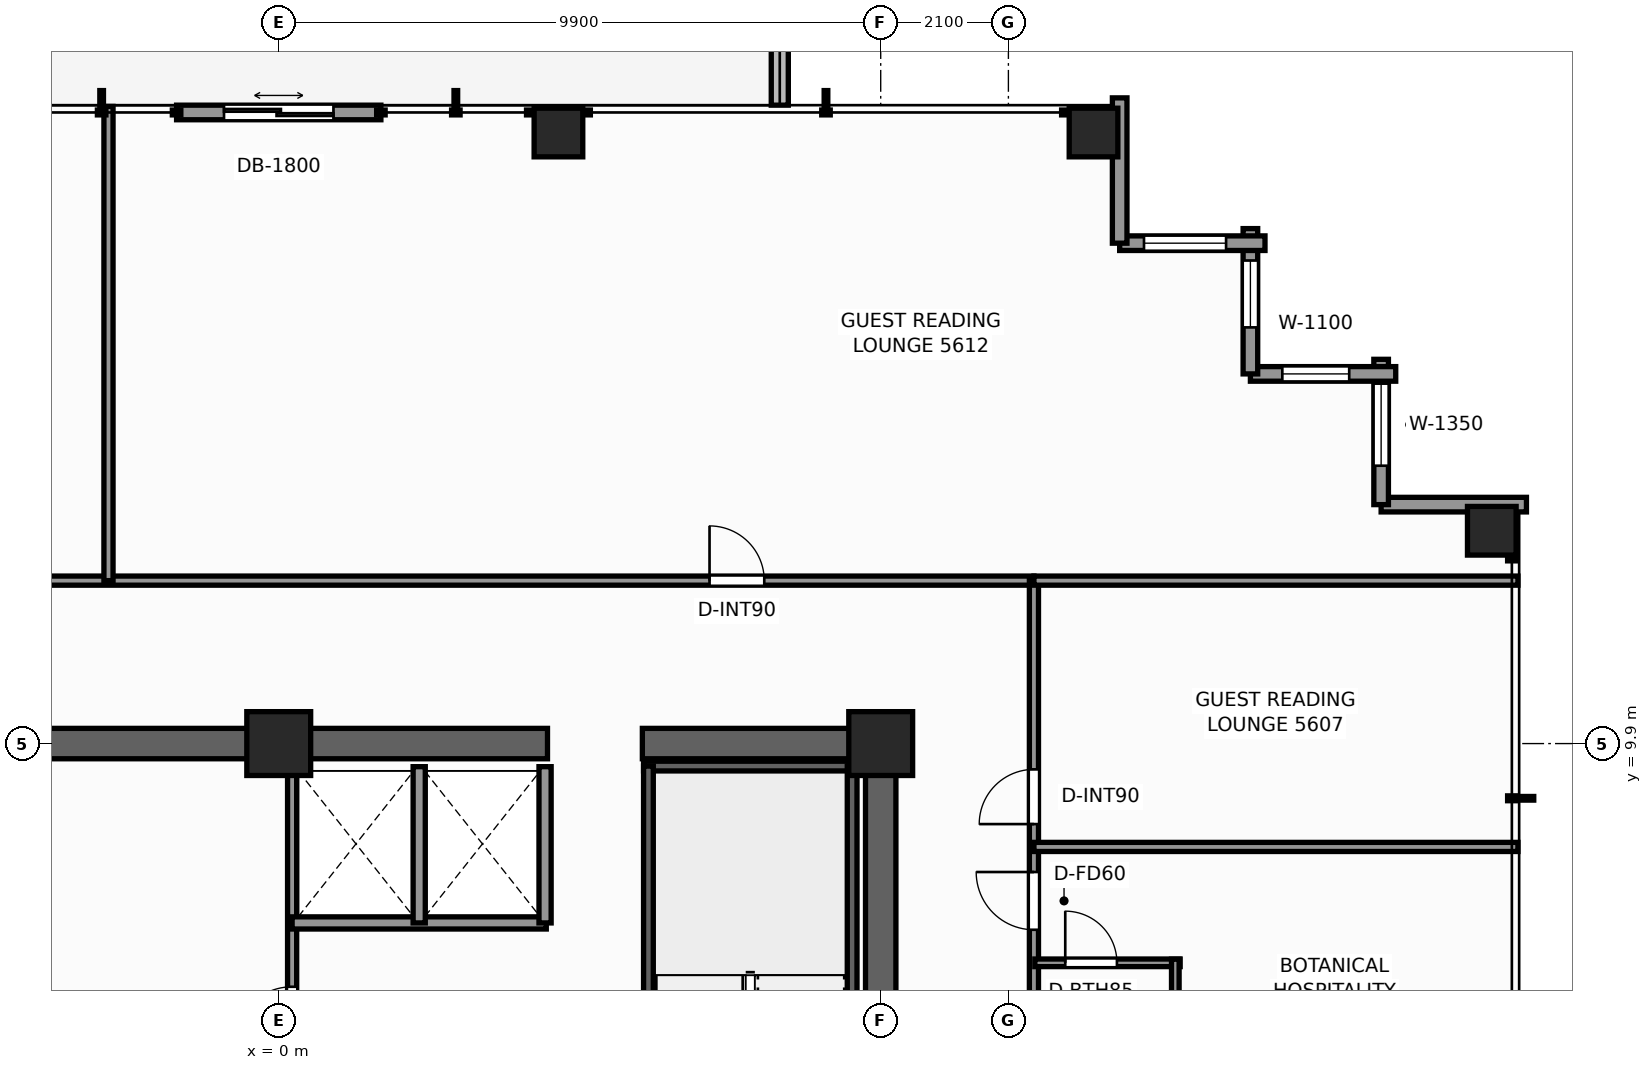
"""IFC4 building model, lengths in metres.
Left out: names, types, materials, properties, quantities, classifications, styles, units other than length and angle.
Written with IfcOpenShell. Run it as: python <this file> out.ifc"""

import sys

from ifc_helpers import new_model, si_unit, direction, frame, frame_2d, origin, origin_2d, place, context, subcontext, project, spatial, rectangle, extrude, element, fill, save


model = new_model("IFC4")
c1 = context("Model", 3, precision=1e-05, world=origin(), true_north=direction((0.0, 1.0)))
c2 = subcontext(c1, "Body", "Model", "MODEL_VIEW")
j1 = project(units=[si_unit("LENGTHUNIT", "METRE"), si_unit("PLANEANGLEUNIT", "RADIAN")], contexts=[c1])
p1 = place(None, origin())
s1 = spatial("IfcSite", under=j1, at=p1, CompositionType="ELEMENT")
p2 = place(p1, origin())
s2 = spatial("IfcBuilding", under=s1, at=p2, CompositionType="ELEMENT")
p3 = place(p2, frame((0.0, 0.0, 193.2)))
s3 = spatial("IfcBuildingStorey", under=s2, at=p3, CompositionType="ELEMENT", Elevation=193.2)
p4 = place(p3, frame((-10.15, 9.9, 0.0), z_axis=(0.0, 0.0, 1.0), x_axis=(1.0, 0.0, 0.0)))
e1 = element("IfcWall", 1, at=p4, inside=s3, PredefinedType="SHEAR", context=c2, shape_type="SweptSolid", body=[
    extrude(rectangle(XDim=14.57, YDim=0.5, at=frame_2d((7.285, 0.0))), origin(), (0.0, 0.0, 1.0), 3.3),
])
p5 = place(p3, frame((5.98, 9.9, 0.0), z_axis=(0.0, 0.0, 1.0), x_axis=(1.0, 0.0, 0.0)))
e2 = element("IfcWall", 2, at=p5, inside=s3, PredefinedType="SHEAR", context=c2, shape_type="SweptSolid", body=[
    extrude(rectangle(XDim=4.17, YDim=0.5, at=frame_2d((2.085, 0.0))), origin(), (0.0, 0.0, 1.0), 3.3),
])
p6 = place(p3, frame((9.9, -3.7, 0.0), z_axis=(0.0, 0.0, 1.0), x_axis=(0.0, 1.0, 0.0)))
e3 = element("IfcWall", 3, at=p6, inside=s3, PredefinedType="SHEAR", context=c2, shape_type="SweptSolid", body=[
    extrude(rectangle(XDim=13.35, YDim=0.5, at=frame_2d((6.675, 0.0))), origin(), (0.0, 0.0, 1.0), 3.3),
])
p7 = place(p6, frame((0.35, 0.0, 0.0)))
e4 = element("IfcOpeningElement", 4, at=p7, cuts=e3, PredefinedType="OPENING", context=c2, shape_type="SweptSolid", body=[
    extrude(rectangle(XDim=1.1, YDim=2.2, at=frame_2d((0.55, 1.1))), frame((0.0, 0.26, 0.0), z_axis=(0.0, -1.0, 0.0), x_axis=(1.0, 0.0, 0.0)), (0.0, 0.0, 1.0), 0.52),
])
for number, where, z_axis, x_axis in (
    (5, (9.9, 9.9, 0.0), (0.0, 0.0, 1.0), (1.0, 0.0, 0.0)),
    (6, (0.0, 9.9, 0.0), (0.0, 0.0, 1.0), (1.0, 0.0, 0.0)),
):
    element("IfcColumn", number, at=place(p3, frame(where, z_axis=z_axis, x_axis=x_axis)), inside=s3, PredefinedType="COLUMN", context=c2, shape_type="SweptSolid", body=[
        extrude(rectangle(XDim=1.05, YDim=1.05, at=origin_2d()), origin(), (0.0, 0.0, 1.0), 3.3),
    ])
for number, where, z_axis, x_axis in (
    (7, (4.6, 19.95, 0.0), (0.0, 0.0, 1.0), (1.0, 0.0, 0.0)),
    (8, (13.4, 19.95, 0.0), (0.0, 0.0, 1.0), (1.0, 0.0, 0.0)),
    (9, (19.95, 13.4, 0.0), (0.0, 0.0, 1.0), (1.0, 0.0, 0.0)),
):
    element("IfcColumn", number, at=place(p3, frame(where, z_axis=z_axis, x_axis=x_axis)), inside=s3, PredefinedType="COLUMN", context=c2, shape_type="SweptSolid", body=[
        extrude(rectangle(XDim=0.8, YDim=0.8, at=origin_2d()), origin(), (0.0, 0.0, 1.0), 3.3),
    ])
p8 = place(p3, frame((8.24, 20.4, -0.04), z_axis=(0.0, 0.0, 1.0), x_axis=(0.0, 1.0, 0.0)))
e10 = element("IfcWall", 10, at=p8, inside=s3, PredefinedType="PARAPET", context=c2, shape_type="SweptSolid", body=[
    extrude(rectangle(XDim=2.34, YDim=0.28, at=frame_2d((1.17, 0.0))), origin(), (0.0, 0.0, 1.0), 0.42),
])
p9 = place(p3, frame((18.13, 13.83, 0.0), z_axis=(0.0, 0.0, 1.0), x_axis=(1.0, 0.0, 0.0)))
e11 = element("IfcWall", 11, at=p9, inside=s3, PredefinedType="STANDARD", context=c2, shape_type="SweptSolid", body=[
    extrude(rectangle(XDim=2.39, YDim=0.24, at=frame_2d((1.195, 0.0))), origin(), (0.0, 0.0, 1.0), 2.463),
])
p10 = place(p3, frame((18.13, 16.22, 0.0), z_axis=(0.0, 0.0, 1.0), x_axis=(0.0, -1.0, 0.0)))
e12 = element("IfcWall", 12, at=p10, inside=s3, PredefinedType="STANDARD", context=c2, shape_type="SweptSolid", body=[
    extrude(rectangle(XDim=2.39, YDim=0.24, at=frame_2d((1.195, 0.0))), origin(), (0.0, 0.0, 1.0), 2.463),
])
p11 = place(p10, frame((0.4, 0.0, 0.65)))
e13 = element("IfcOpeningElement", 13, at=p11, cuts=e12, PredefinedType="OPENING", context=c2, shape_type="SweptSolid", body=[
    extrude(rectangle(XDim=1.35, YDim=1.55, at=frame_2d((0.675, 0.775))), frame((0.0, 0.13, 0.0), z_axis=(0.0, -1.0, 0.0), x_axis=(1.0, 0.0, 0.0)), (0.0, 0.0, 1.0), 0.26),
])
p12 = place(p3, frame((15.98, 15.98, 0.0), z_axis=(0.0, 0.0, 1.0), x_axis=(1.0, 0.0, 0.0)))
e14 = element("IfcWall", 14, at=p12, inside=s3, PredefinedType="STANDARD", context=c2, shape_type="SweptSolid", body=[
    extrude(rectangle(XDim=2.39, YDim=0.24, at=frame_2d((1.195, 0.0))), origin(), (0.0, 0.0, 1.0), 2.463),
])
p13 = place(p12, frame((0.525, 0.0, 0.65)))
e15 = element("IfcOpeningElement", 15, at=p13, cuts=e14, PredefinedType="OPENING", context=c2, shape_type="SweptSolid", body=[
    extrude(rectangle(XDim=1.1, YDim=1.45, at=frame_2d((0.55, 0.725))), frame((0.0, 0.13, 0.0), z_axis=(0.0, -1.0, 0.0), x_axis=(1.0, 0.0, 0.0)), (0.0, 0.0, 1.0), 0.26),
])
p14 = place(p3, frame((15.98, 18.37, 0.0), z_axis=(0.0, 0.0, 1.0), x_axis=(0.0, -1.0, 0.0)))
e16 = element("IfcWall", 16, at=p14, inside=s3, PredefinedType="STANDARD", context=c2, shape_type="SweptSolid", body=[
    extrude(rectangle(XDim=2.39, YDim=0.24, at=frame_2d((1.195, 0.0))), origin(), (0.0, 0.0, 1.0), 2.463),
])
p15 = place(p14, frame((0.525, 0.0, 0.65)))
e17 = element("IfcOpeningElement", 17, at=p15, cuts=e16, PredefinedType="OPENING", context=c2, shape_type="SweptSolid", body=[
    extrude(rectangle(XDim=1.1, YDim=1.45, at=frame_2d((0.55, 0.725))), frame((0.0, 0.13, 0.0), z_axis=(0.0, -1.0, 0.0), x_axis=(1.0, 0.0, 0.0)), (0.0, 0.0, 1.0), 0.26),
])
p16 = place(p3, frame((13.83, 18.13, 0.0), z_axis=(0.0, 0.0, 1.0), x_axis=(1.0, 0.0, 0.0)))
e18 = element("IfcWall", 18, at=p16, inside=s3, PredefinedType="STANDARD", context=c2, shape_type="SweptSolid", body=[
    extrude(rectangle(XDim=2.39, YDim=0.24, at=frame_2d((1.195, 0.0))), origin(), (0.0, 0.0, 1.0), 2.463),
])
p17 = place(p16, frame((0.4, 0.0, 0.65)))
e19 = element("IfcOpeningElement", 19, at=p17, cuts=e18, PredefinedType="OPENING", context=c2, shape_type="SweptSolid", body=[
    extrude(rectangle(XDim=1.35, YDim=1.55, at=frame_2d((0.675, 0.775))), frame((0.0, 0.13, 0.0), z_axis=(0.0, -1.0, 0.0), x_axis=(1.0, 0.0, 0.0)), (0.0, 0.0, 1.0), 0.26),
])
p18 = place(p3, frame((13.83, 20.52, 0.0), z_axis=(0.0, 0.0, 1.0), x_axis=(0.0, -1.0, 0.0)))
e20 = element("IfcWall", 20, at=p18, inside=s3, PredefinedType="STANDARD", context=c2, shape_type="SweptSolid", body=[
    extrude(rectangle(XDim=2.39, YDim=0.24, at=frame_2d((1.195, 0.0))), origin(), (0.0, 0.0, 1.0), 2.463),
])
p19 = place(p3, frame((-1.68, 20.28, 0.0), z_axis=(0.0, 0.0, 1.0), x_axis=(1.0, 0.0, 0.0)))
e21 = element("IfcWall", 21, at=p19, inside=s3, PredefinedType="STANDARD", context=c2, shape_type="SweptSolid", body=[
    extrude(rectangle(XDim=3.36, YDim=0.24, at=frame_2d((1.68, 0.0))), origin(), (0.0, 0.0, 1.0), 3.08),
])
p20 = place(p19, frame((0.78, 0.0, 0.0)))
e22 = element("IfcOpeningElement", 22, at=p20, cuts=e21, PredefinedType="OPENING", context=c2, shape_type="SweptSolid", body=[
    extrude(rectangle(XDim=1.8, YDim=2.2, at=frame_2d((0.9, 1.1))), frame((0.0, 0.13, 0.0), z_axis=(0.0, -1.0, 0.0), x_axis=(1.0, 0.0, 0.0)), (0.0, 0.0, 1.0), 0.26),
])
p21 = place(p3, frame((6.0, 9.53, 0.0), z_axis=(0.0, 0.0, 1.0), x_axis=(1.0, 0.0, 0.0)))
e23 = element("IfcWall", 23, at=p21, inside=s3, PredefinedType="SHEAR", context=c2, shape_type="SweptSolid", body=[
    extrude(rectangle(XDim=3.52, YDim=0.16, at=frame_2d((1.76, 0.0))), origin(), (0.0, 0.0, 1.0), 3.3),
])
for number, where, z_axis, x_axis in (
    (24, (6.08, 1.97, 0.0), (0.0, 0.0, 1.0), (0.0, 1.0, 0.0)),
    (25, (9.43, 1.97, 0.0), (0.0, 0.0, 1.0), (0.0, 1.0, 0.0)),
):
    element("IfcWall", number, at=place(p3, frame(where, z_axis=z_axis, x_axis=x_axis)), inside=s3, PredefinedType="SHEAR", context=c2, shape_type="SweptSolid", body=[
        extrude(rectangle(XDim=7.56, YDim=0.16, at=frame_2d((3.78, 0.0))), origin(), (0.0, 0.0, 1.0), 3.3),
    ])
p22 = place(p3, frame((0.22, 4.3, 0.0), z_axis=(0.0, 0.0, 1.0), x_axis=(0.0, 1.0, 0.0)))
e26 = element("IfcWall", 26, at=p22, inside=s3, PredefinedType="PARTITIONING", context=c2, shape_type="SweptSolid", body=[
    extrude(rectangle(XDim=5.22, YDim=0.15, at=frame_2d((2.61, 0.0))), origin(), (0.0, 0.0, 1.0), 3.08),
])
p23 = place(p22, frame((0.65, 0.0, 0.0)))
e27 = element("IfcOpeningElement", 27, at=p23, cuts=e26, PredefinedType="OPENING", context=c2, shape_type="SweptSolid", body=[
    extrude(rectangle(XDim=0.95, YDim=2.06, at=frame_2d((0.475, 1.03))), frame((0.0, 0.085, 0.0), z_axis=(0.0, -1.0, 0.0), x_axis=(1.0, 0.0, 0.0)), (0.0, 0.0, 1.0), 0.17),
])
p24 = place(p3, frame((0.22, 6.95, 0.0), z_axis=(0.0, 0.0, 1.0), x_axis=(1.0, 0.0, 0.0)))
e28 = element("IfcWall", 28, at=p24, inside=s3, PredefinedType="SOLIDWALL", context=c2, shape_type="SweptSolid", body=[
    extrude(rectangle(XDim=4.18, YDim=0.2, at=frame_2d((2.09, 0.0))), origin(), (0.0, 0.0, 1.0), 3.08),
])
for number, where, z_axis, x_axis in (
    (29, (4.38, 6.95, 0.0), (0.0, 0.0, 1.0), (0.0, 1.0, 0.0)),
    (30, (2.31, 6.95, 0.0), (0.0, 0.0, 1.0), (0.0, 1.0, 0.0)),
):
    element("IfcWall", number, at=place(p3, frame(where, z_axis=z_axis, x_axis=x_axis)), inside=s3, PredefinedType="SOLIDWALL", context=c2, shape_type="SweptSolid", body=[
        extrude(rectangle(XDim=2.57, YDim=0.2, at=frame_2d((1.285, 0.0))), origin(), (0.0, 0.0, 1.0), 3.08),
    ])
p25 = place(p3, frame((-12.42, 12.58, 0.0), z_axis=(0.0, 0.0, 1.0), x_axis=(1.0, 0.0, 0.0)))
e31 = element("IfcWall", 31, at=p25, inside=s3, PredefinedType="PARTITIONING", context=c2, shape_type="SweptSolid", body=[
    extrude(rectangle(XDim=24.84, YDim=0.15, at=frame_2d((12.42, 0.0))), origin(), (0.0, 0.0, 1.0), 2.369),
])
p26 = place(p25, frame((4.435, 0.0, 0.0)))
e32 = element("IfcOpeningElement", 32, at=p26, cuts=e31, PredefinedType="OPENING", context=c2, shape_type="SweptSolid", body=[
    extrude(rectangle(XDim=0.9, YDim=2.06, at=frame_2d((0.45, 1.03))), frame((0.0, 0.085, 0.0), z_axis=(0.0, -1.0, 0.0), x_axis=(1.0, 0.0, 0.0)), (0.0, 0.0, 1.0), 0.17),
])
p27 = place(p25, frame((19.505, 0.0, 0.0)))
e33 = element("IfcOpeningElement", 33, at=p27, cuts=e31, PredefinedType="OPENING", context=c2, shape_type="SweptSolid", body=[
    extrude(rectangle(XDim=0.9, YDim=2.06, at=frame_2d((0.45, 1.03))), frame((0.0, 0.085, 0.0), z_axis=(0.0, -1.0, 0.0), x_axis=(1.0, 0.0, 0.0)), (0.0, 0.0, 1.0), 0.17),
])
p28 = place(p3, frame((12.42, -12.26, 0.0), z_axis=(0.0, 0.0, 1.0), x_axis=(0.0, 1.0, 0.0)))
e34 = element("IfcWall", 34, at=p28, inside=s3, PredefinedType="PARTITIONING", context=c2, shape_type="SweptSolid", body=[
    extrude(rectangle(XDim=24.84, YDim=0.15, at=frame_2d((12.42, 0.0))), origin(), (0.0, 0.0, 1.0), 2.369),
])
p29 = place(p28, frame((2.944, 0.0, 0.0)))
e35 = element("IfcOpeningElement", 35, at=p29, cuts=e34, PredefinedType="OPENING", context=c2, shape_type="SweptSolid", body=[
    extrude(rectangle(XDim=0.9, YDim=2.06, at=frame_2d((0.45, 1.03))), frame((0.0, 0.085, 0.0), z_axis=(0.0, -1.0, 0.0), x_axis=(1.0, 0.0, 0.0)), (0.0, 0.0, 1.0), 0.17),
])
p30 = place(p28, frame((5.279, 0.0, 0.0)))
e36 = element("IfcOpeningElement", 36, at=p30, cuts=e34, PredefinedType="OPENING", context=c2, shape_type="SweptSolid", body=[
    extrude(rectangle(XDim=0.9, YDim=2.06, at=frame_2d((0.45, 1.03))), frame((0.0, 0.085, 0.0), z_axis=(0.0, -1.0, 0.0), x_axis=(1.0, 0.0, 0.0)), (0.0, 0.0, 1.0), 0.17),
])
p31 = place(p28, frame((13.602, 0.0, 0.0)))
e37 = element("IfcOpeningElement", 37, at=p31, cuts=e34, PredefinedType="OPENING", context=c2, shape_type="SweptSolid", body=[
    extrude(rectangle(XDim=0.9, YDim=2.06, at=frame_2d((0.45, 1.03))), frame((0.0, 0.085, 0.0), z_axis=(0.0, -1.0, 0.0), x_axis=(1.0, 0.0, 0.0)), (0.0, 0.0, 1.0), 0.17),
])
p32 = place(p28, frame((19.098, 0.0, 0.0)))
e38 = element("IfcOpeningElement", 38, at=p32, cuts=e34, PredefinedType="OPENING", context=c2, shape_type="SweptSolid", body=[
    extrude(rectangle(XDim=0.95, YDim=2.06, at=frame_2d((0.475, 1.03))), frame((0.0, 0.085, 0.0), z_axis=(0.0, -1.0, 0.0), x_axis=(1.0, 0.0, 0.0)), (0.0, 0.0, 1.0), 0.17),
])
p33 = place(p28, frame((20.836, 0.0, 0.0)))
e39 = element("IfcOpeningElement", 39, at=p33, cuts=e34, PredefinedType="OPENING", context=c2, shape_type="SweptSolid", body=[
    extrude(rectangle(XDim=0.9, YDim=2.06, at=frame_2d((0.45, 1.03))), frame((0.0, 0.085, 0.0), z_axis=(0.0, -1.0, 0.0), x_axis=(1.0, 0.0, 0.0)), (0.0, 0.0, 1.0), 0.17),
])
p34 = place(p3, frame((12.42, 12.58, 0.0), z_axis=(0.0, 0.0, 1.0), x_axis=(1.0, 0.0, 0.0)))
e40 = element("IfcWall", 40, at=p34, inside=s3, PredefinedType="PARTITIONING", context=c2, shape_type="SweptSolid", body=[
    extrude(rectangle(XDim=7.96, YDim=0.15, at=frame_2d((3.98, 0.0))), origin(), (0.0, 0.0, 1.0), 2.369),
])
p35 = place(p3, frame((12.42, 8.2, 0.0), z_axis=(0.0, 0.0, 1.0), x_axis=(1.0, 0.0, 0.0)))
e41 = element("IfcWall", 41, at=p35, inside=s3, PredefinedType="PARTITIONING", context=c2, shape_type="SweptSolid", body=[
    extrude(rectangle(XDim=7.96, YDim=0.15, at=frame_2d((3.98, 0.0))), origin(), (0.0, 0.0, 1.0), 2.453),
])
p36 = place(p3, frame((12.435, 6.294, 0.0), z_axis=(0.0, 0.0, 1.0), x_axis=(1.0, 0.0, 0.0)))
e42 = element("IfcWall", 42, at=p36, inside=s3, PredefinedType="PARTITIONING", context=c2, shape_type="SweptSolid", body=[
    extrude(rectangle(XDim=2.39, YDim=0.125, at=frame_2d((1.195, 0.0))), origin(), (0.0, 0.0, 1.0), 3.08),
])
p37 = place(p36, frame((0.5, 0.0, 0.0)))
e43 = element("IfcOpeningElement", 43, at=p37, cuts=e42, PredefinedType="OPENING", context=c2, shape_type="SweptSolid", body=[
    extrude(rectangle(XDim=0.85, YDim=2.03, at=frame_2d((0.425, 1.015))), frame((0.0, 0.073, 0.0), z_axis=(0.0, -1.0, 0.0), x_axis=(1.0, 0.0, 0.0)), (0.0, 0.0, 1.0), 0.145),
])
p38 = place(p3, frame((14.745, 3.584, 0.0), z_axis=(0.0, 0.0, 1.0), x_axis=(0.0, 1.0, 0.0)))
e44 = element("IfcWall", 44, at=p38, inside=s3, PredefinedType="PARTITIONING", context=c2, shape_type="SweptSolid", body=[
    extrude(rectangle(XDim=2.77, YDim=0.125, at=frame_2d((1.385, 0.0))), origin(), (0.0, 0.0, 1.0), 2.369),
])
p39 = place(p3, frame((-2.8, 12.58, 0.0), z_axis=(0.0, 0.0, 1.0), x_axis=(0.0, 1.0, 0.0)))
e45 = element("IfcWall", 45, at=p39, inside=s3, PredefinedType="PARTITIONING", context=c2, shape_type="SweptSolid", body=[
    extrude(rectangle(XDim=7.8, YDim=0.15, at=frame_2d((3.9, 0.0))), origin(), (0.0, 0.0, 1.0), 2.453),
])
p40 = place(p11, origin())
e46 = element("IfcWindow", 46, at=p40, inside=s3, PartitioningType="SINGLE_PANEL", PredefinedType="WINDOW", context=c2, shape_type="SweptSolid", body=[
    extrude(rectangle(XDim=1.35, YDim=1.55, at=frame_2d((0.675, 0.775))), frame((0.0, 0.03, 0.0), z_axis=(0.0, -1.0, 0.0), x_axis=(1.0, 0.0, 0.0)), (0.0, 0.0, 1.0), 0.06),
])
fill(e13, e46)
p41 = place(p13, origin())
e47 = element("IfcWindow", 47, at=p41, inside=s3, PartitioningType="SINGLE_PANEL", PredefinedType="WINDOW", context=c2, shape_type="SweptSolid", body=[
    extrude(rectangle(XDim=1.1, YDim=1.45, at=frame_2d((0.55, 0.725))), frame((0.0, 0.03, 0.0), z_axis=(0.0, -1.0, 0.0), x_axis=(1.0, 0.0, 0.0)), (0.0, 0.0, 1.0), 0.06),
])
fill(e15, e47)
p42 = place(p15, origin())
e48 = element("IfcWindow", 48, at=p42, inside=s3, PartitioningType="SINGLE_PANEL", PredefinedType="WINDOW", context=c2, shape_type="SweptSolid", body=[
    extrude(rectangle(XDim=1.1, YDim=1.45, at=frame_2d((0.55, 0.725))), frame((0.0, 0.03, 0.0), z_axis=(0.0, -1.0, 0.0), x_axis=(1.0, 0.0, 0.0)), (0.0, 0.0, 1.0), 0.06),
])
fill(e17, e48)
p43 = place(p17, origin())
e49 = element("IfcWindow", 49, at=p43, inside=s3, PartitioningType="SINGLE_PANEL", PredefinedType="WINDOW", context=c2, shape_type="SweptSolid", body=[
    extrude(rectangle(XDim=1.35, YDim=1.55, at=frame_2d((0.675, 0.775))), frame((0.0, 0.03, 0.0), z_axis=(0.0, -1.0, 0.0), x_axis=(1.0, 0.0, 0.0)), (0.0, 0.0, 1.0), 0.06),
])
fill(e19, e49)
p44 = place(p20, origin())
e50 = element("IfcDoor", 50, at=p44, inside=s3, OperationType="DOUBLE_DOOR_SLIDING", PredefinedType="DOOR", context=c2, shape_type="SweptSolid", body=[
    extrude(rectangle(XDim=1.8, YDim=2.2, at=frame_2d((0.9, 1.1))), frame((0.0, 0.025, 0.0), z_axis=(0.0, -1.0, 0.0), x_axis=(1.0, 0.0, 0.0)), (0.0, 0.0, 1.0), 0.05),
])
fill(e22, e50)
p45 = place(p23, origin())
e51 = element("IfcDoor", 51, at=p45, inside=s3, OperationType="SINGLE_SWING_LEFT", PredefinedType="DOOR", context=c2, shape_type="SweptSolid", body=[
    extrude(rectangle(XDim=0.95, YDim=2.06, at=frame_2d((0.475, 1.03))), frame((0.0, 0.025, 0.0), z_axis=(0.0, -1.0, 0.0), x_axis=(1.0, 0.0, 0.0)), (0.0, 0.0, 1.0), 0.05),
])
fill(e27, e51)
p46 = place(p37, origin())
e52 = element("IfcDoor", 52, at=p46, inside=s3, OperationType="SINGLE_SWING_LEFT", PredefinedType="DOOR", context=c2, shape_type="SweptSolid", body=[
    extrude(rectangle(XDim=0.85, YDim=2.03, at=frame_2d((0.425, 1.015))), frame((0.0, 0.025, 0.0), z_axis=(0.0, -1.0, 0.0), x_axis=(1.0, 0.0, 0.0)), (0.0, 0.0, 1.0), 0.05),
])
fill(e43, e52)
p47 = place(p32, origin())
e53 = element("IfcDoor", 53, at=p47, inside=s3, OperationType="SINGLE_SWING_RIGHT", PredefinedType="DOOR", context=c2, shape_type="SweptSolid", body=[
    extrude(rectangle(XDim=0.95, YDim=2.06, at=frame_2d((0.475, 1.03))), frame((0.0, 0.025, 0.0), z_axis=(0.0, -1.0, 0.0), x_axis=(1.0, 0.0, 0.0)), (0.0, 0.0, 1.0), 0.05),
])
fill(e38, e53)
p48 = place(p33, origin())
e54 = element("IfcDoor", 54, at=p48, inside=s3, OperationType="SINGLE_SWING_LEFT", PredefinedType="DOOR", context=c2, shape_type="SweptSolid", body=[
    extrude(rectangle(XDim=0.9, YDim=2.06, at=frame_2d((0.45, 1.03))), frame((0.0, 0.025, 0.0), z_axis=(0.0, -1.0, 0.0), x_axis=(1.0, 0.0, 0.0)), (0.0, 0.0, 1.0), 0.05),
])
fill(e39, e54)
p49 = place(p27, origin())
e55 = element("IfcDoor", 55, at=p49, inside=s3, OperationType="SINGLE_SWING_LEFT", PredefinedType="DOOR", context=c2, shape_type="SweptSolid", body=[
    extrude(rectangle(XDim=0.9, YDim=2.06, at=frame_2d((0.45, 1.03))), frame((0.0, 0.025, 0.0), z_axis=(0.0, -1.0, 0.0), x_axis=(1.0, 0.0, 0.0)), (0.0, 0.0, 1.0), 0.05),
])
fill(e33, e55)
save(model, sys.argv[1])
